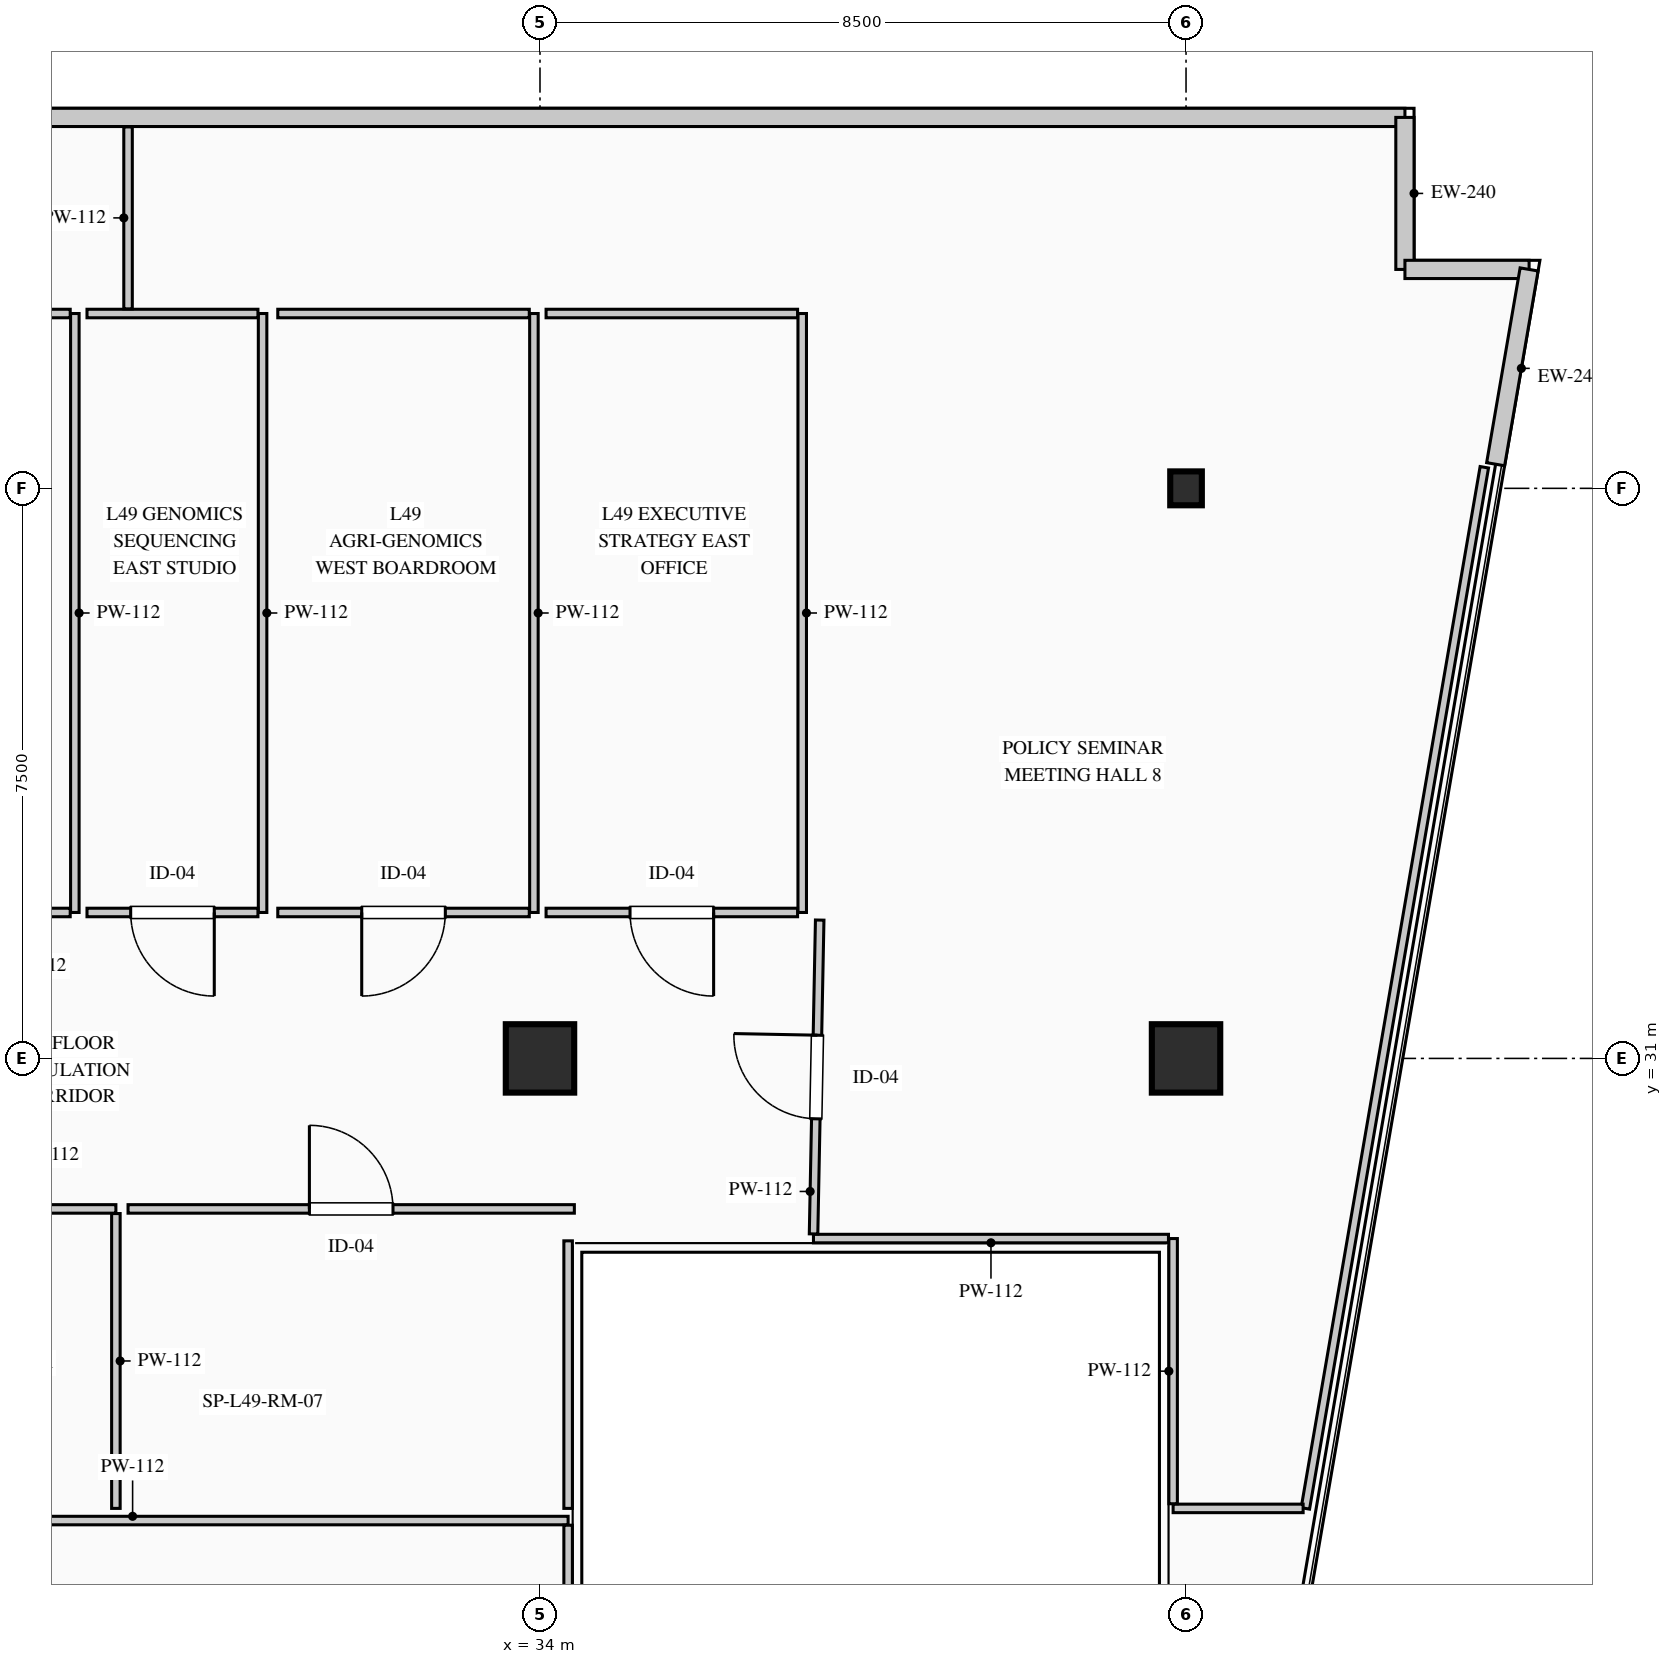
"""IFC4 building model, lengths in metres.
Left out: names, types, materials, properties, quantities, classifications, styles, units other than length and angle.
Written with IfcOpenShell. Run it as: python <this file> out.ifc"""

import sys

from ifc_helpers import new_model, si_unit, direction, frame, frame_2d, origin, origin_2d, place, context, subcontext, project, spatial, rectangle, i_section, extrude, element, fill, save


model = new_model("IFC4")
c1 = context("Model", 3, precision=1e-05, world=origin(), true_north=direction((0.0, 1.0)))
c2 = subcontext(c1, "Body", "Model", "MODEL_VIEW")
j1 = project(units=[si_unit("LENGTHUNIT", "METRE"), si_unit("PLANEANGLEUNIT", "RADIAN")], contexts=[c1])
p1 = place(None, origin())
s1 = spatial("IfcSite", under=j1, at=p1, CompositionType="ELEMENT")
p2 = place(p1, origin())
s2 = spatial("IfcBuilding", under=s1, at=p2, CompositionType="ELEMENT")
p3 = place(p2, frame((0.0, 0.0, 207.45)))
s3 = spatial("IfcBuildingStorey", under=s2, at=p3, CompositionType="ELEMENT", Elevation=207.45)
for number, where, z_axis, x_axis in (
    (1, (34.0, 31.0, 0.0), (0.0, 0.0, 1.0), (1.0, 0.0, 0.0)),
    (2, (42.5, 31.0, 0.0), (0.0, 0.0, 1.0), (1.0, 0.0, 0.0)),
):
    element("IfcColumn", number, at=place(p3, frame(where, z_axis=z_axis, x_axis=x_axis)), inside=s3, PredefinedType="COLUMN", context=c2, shape_type="SweptSolid", body=[
        extrude(rectangle(XDim=0.9, YDim=0.9, at=origin_2d()), origin(), (0.0, 0.0, 1.0), 3.95),
    ])
p4 = place(p3, frame((42.5, 38.5, 0.0), z_axis=(0.0, 0.0, 1.0), x_axis=(1.0, 0.0, 0.0)))
e3 = element("IfcColumn", 3, at=p4, inside=s3, PredefinedType="COLUMN", context=c2, shape_type="SweptSolid", body=[
    extrude(i_section(OverallWidth=0.416, OverallDepth=0.446, WebThickness=0.039, FlangeThickness=0.063, FilletRadius=0.015, at=origin_2d()), origin(), (0.0, 0.0, 1.0), 3.95),
])
p5 = place(p3, frame((4.62, 43.38, 0.0), z_axis=(0.0, 0.0, 1.0), x_axis=(1.0, 0.0, 0.0)))
e4 = element("IfcWall", 4, at=p5, inside=s3, PredefinedType="STANDARD", context=c2, shape_type="SweptSolid", body=[
    extrude(rectangle(XDim=40.76, YDim=0.24, at=frame_2d((20.38, 0.0))), origin(), (0.0, 0.0, 1.0), 3.7),
])
p6 = place(p5, frame((13.324, 0.0, 0.9)))
e5 = element("IfcOpeningElement", 5, at=p6, cuts=e4, PredefinedType="OPENING", context=c2, shape_type="SweptSolid", body=[
    extrude(rectangle(XDim=2.7, YDim=2.1, at=frame_2d((1.35, 1.05))), frame((0.0, 0.13, 0.0), z_axis=(0.0, -1.0, 0.0), x_axis=(1.0, 0.0, 0.0)), (0.0, 0.0, 1.0), 0.26),
])
p7 = place(p3, frame((45.38, 43.38, 0.0), z_axis=(0.0, 0.0, 1.0), x_axis=(0.0, -1.0, 0.0)))
e6 = element("IfcWall", 6, at=p7, inside=s3, PredefinedType="STANDARD", context=c2, shape_type="SweptSolid", body=[
    extrude(rectangle(XDim=2.0, YDim=0.24, at=frame_2d((1.0, 0.0))), origin(), (0.0, 0.0, 1.0), 3.7),
])
p8 = place(p3, frame((45.38, 41.38, 0.0), z_axis=(0.0, 0.0, 1.0), x_axis=(1.0, 0.0, 0.0)))
e7 = element("IfcWall", 7, at=p8, inside=s3, PredefinedType="STANDARD", context=c2, shape_type="SweptSolid", body=[
    extrude(rectangle(XDim=1.634, YDim=0.24, at=frame_2d((0.817, 0.0))), origin(), (0.0, 0.0, 1.0), 3.7),
])
p9 = place(p3, frame((47.014, 41.38, 0.0), z_axis=(0.0, 0.0, 1.0), x_axis=(-0.169406892601, -0.985546196147, 0.0)))
e8 = element("IfcWall", 8, at=p9, inside=s3, PredefinedType="STANDARD", context=c2, shape_type="SweptSolid", body=[
    extrude(rectangle(XDim=2.6, YDim=0.24, at=frame_2d((1.3, 0.0))), origin(), (0.0, 0.0, 1.0), 3.7),
])
p10 = place(p3, frame((27.88, 40.8, 0.0), z_axis=(0.0, 0.0, 1.0), x_axis=(0.0, -1.0, 0.0)))
e9 = element("IfcWall", 9, at=p10, inside=s3, PredefinedType="PARTITIONING", context=c2, shape_type="SweptSolid", body=[
    extrude(rectangle(XDim=7.88, YDim=0.112, at=frame_2d((3.94, 0.0))), origin(), (0.0, 0.0, 1.0), 3.7),
])
p11 = place(p3, frame((27.819, 32.92, 0.0), z_axis=(0.0, 0.0, 1.0), x_axis=(-1.0, 0.0, 0.0)))
e10 = element("IfcWall", 10, at=p11, inside=s3, PredefinedType="PARTITIONING", context=c2, shape_type="SweptSolid", body=[
    extrude(rectangle(XDim=3.769, YDim=0.112, at=frame_2d((1.885, 0.0))), origin(), (0.0, 0.0, 1.0), 3.7),
])
p12 = place(p11, frame((1.334, 0.0, 0.0)))
e11 = element("IfcOpeningElement", 11, at=p12, cuts=e10, PredefinedType="OPENING", context=c2, shape_type="SweptSolid", body=[
    extrude(rectangle(XDim=1.1, YDim=2.2, at=frame_2d((0.55, 1.1))), frame((0.0, 0.066, 0.0), z_axis=(0.0, -1.0, 0.0), x_axis=(1.0, 0.0, 0.0)), (0.0, 0.0, 1.0), 0.132),
])
p13 = place(p3, frame((24.111, 40.8, 0.0), z_axis=(0.0, 0.0, 1.0), x_axis=(1.0, 0.0, 0.0)))
e12 = element("IfcWall", 12, at=p13, inside=s3, PredefinedType="PARTITIONING", context=c2, shape_type="SweptSolid", body=[
    extrude(rectangle(XDim=3.708, YDim=0.112, at=frame_2d((1.854, 0.0))), origin(), (0.0, 0.0, 1.0), 3.7),
])
p14 = place(p3, frame((30.35, 40.8, 0.0), z_axis=(0.0, 0.0, 1.0), x_axis=(0.0, -1.0, 0.0)))
e13 = element("IfcWall", 13, at=p14, inside=s3, PredefinedType="PARTITIONING", context=c2, shape_type="SweptSolid", body=[
    extrude(rectangle(XDim=7.88, YDim=0.112, at=frame_2d((3.94, 0.0))), origin(), (0.0, 0.0, 1.0), 3.7),
])
p15 = place(p3, frame((30.289, 32.92, 0.0), z_axis=(0.0, 0.0, 1.0), x_axis=(-1.0, 0.0, 0.0)))
e14 = element("IfcWall", 14, at=p15, inside=s3, PredefinedType="PARTITIONING", context=c2, shape_type="SweptSolid", body=[
    extrude(rectangle(XDim=2.249, YDim=0.112, at=frame_2d((1.125, 0.0))), origin(), (0.0, 0.0, 1.0), 3.7),
])
p16 = place(p15, frame((0.574, 0.0, 0.0)))
e15 = element("IfcOpeningElement", 15, at=p16, cuts=e14, PredefinedType="OPENING", context=c2, shape_type="SweptSolid", body=[
    extrude(rectangle(XDim=1.1, YDim=2.2, at=frame_2d((0.55, 1.1))), frame((0.0, 0.066, 0.0), z_axis=(0.0, -1.0, 0.0), x_axis=(1.0, 0.0, 0.0)), (0.0, 0.0, 1.0), 0.132),
])
p17 = place(p3, frame((28.04, 40.8, 0.0), z_axis=(0.0, 0.0, 1.0), x_axis=(1.0, 0.0, 0.0)))
e16 = element("IfcWall", 16, at=p17, inside=s3, PredefinedType="PARTITIONING", context=c2, shape_type="SweptSolid", body=[
    extrude(rectangle(XDim=2.249, YDim=0.112, at=frame_2d((1.125, 0.0))), origin(), (0.0, 0.0, 1.0), 3.7),
])
p18 = place(p3, frame((33.92, 40.8, 0.0), z_axis=(0.0, 0.0, 1.0), x_axis=(0.0, -1.0, 0.0)))
e17 = element("IfcWall", 17, at=p18, inside=s3, PredefinedType="PARTITIONING", context=c2, shape_type="SweptSolid", body=[
    extrude(rectangle(XDim=7.88, YDim=0.112, at=frame_2d((3.94, 0.0))), origin(), (0.0, 0.0, 1.0), 3.7),
])
p19 = place(p3, frame((33.859, 32.92, 0.0), z_axis=(0.0, 0.0, 1.0), x_axis=(-1.0, 0.0, 0.0)))
e18 = element("IfcWall", 18, at=p19, inside=s3, PredefinedType="PARTITIONING", context=c2, shape_type="SweptSolid", body=[
    extrude(rectangle(XDim=3.309, YDim=0.112, at=frame_2d((1.654, 0.0))), origin(), (0.0, 0.0, 1.0), 3.7),
])
p20 = place(p19, frame((1.104, 0.0, 0.0)))
e19 = element("IfcOpeningElement", 19, at=p20, cuts=e18, PredefinedType="OPENING", context=c2, shape_type="SweptSolid", body=[
    extrude(rectangle(XDim=1.1, YDim=2.2, at=frame_2d((0.55, 1.1))), frame((0.0, 0.066, 0.0), z_axis=(0.0, -1.0, 0.0), x_axis=(1.0, 0.0, 0.0)), (0.0, 0.0, 1.0), 0.132),
])
p21 = place(p3, frame((30.55, 40.8, 0.0), z_axis=(0.0, 0.0, 1.0), x_axis=(1.0, 0.0, 0.0)))
e20 = element("IfcWall", 20, at=p21, inside=s3, PredefinedType="PARTITIONING", context=c2, shape_type="SweptSolid", body=[
    extrude(rectangle(XDim=3.309, YDim=0.112, at=frame_2d((1.654, 0.0))), origin(), (0.0, 0.0, 1.0), 3.7),
])
p22 = place(p3, frame((37.45, 40.8, 0.0), z_axis=(0.0, 0.0, 1.0), x_axis=(0.0, -1.0, 0.0)))
e21 = element("IfcWall", 21, at=p22, inside=s3, PredefinedType="PARTITIONING", context=c2, shape_type="SweptSolid", body=[
    extrude(rectangle(XDim=7.88, YDim=0.112, at=frame_2d((3.94, 0.0))), origin(), (0.0, 0.0, 1.0), 3.7),
])
p23 = place(p3, frame((37.389, 32.92, 0.0), z_axis=(0.0, 0.0, 1.0), x_axis=(-1.0, 0.0, 0.0)))
e22 = element("IfcWall", 22, at=p23, inside=s3, PredefinedType="PARTITIONING", context=c2, shape_type="SweptSolid", body=[
    extrude(rectangle(XDim=3.309, YDim=0.112, at=frame_2d((1.654, 0.0))), origin(), (0.0, 0.0, 1.0), 3.7),
])
p24 = place(p23, frame((1.104, 0.0, 0.0)))
e23 = element("IfcOpeningElement", 23, at=p24, cuts=e22, PredefinedType="OPENING", context=c2, shape_type="SweptSolid", body=[
    extrude(rectangle(XDim=1.1, YDim=2.2, at=frame_2d((0.55, 1.1))), frame((0.0, 0.066, 0.0), z_axis=(0.0, -1.0, 0.0), x_axis=(1.0, 0.0, 0.0)), (0.0, 0.0, 1.0), 0.132),
])
p25 = place(p3, frame((34.08, 40.8, 0.0), z_axis=(0.0, 0.0, 1.0), x_axis=(1.0, 0.0, 0.0)))
e24 = element("IfcWall", 24, at=p25, inside=s3, PredefinedType="PARTITIONING", context=c2, shape_type="SweptSolid", body=[
    extrude(rectangle(XDim=3.309, YDim=0.112, at=frame_2d((1.654, 0.0))), origin(), (0.0, 0.0, 1.0), 3.7),
])
p26 = place(p3, frame((22.91, 24.92, 0.0), z_axis=(0.0, 0.0, 1.0), x_axis=(1.0, 0.0, 0.0)))
e25 = element("IfcWall", 25, at=p26, inside=s3, PredefinedType="PARTITIONING", context=c2, shape_type="SweptSolid", body=[
    extrude(rectangle(XDim=11.46, YDim=0.112, at=frame_2d((5.73, 0.0))), origin(), (0.0, 0.0, 1.0), 3.325),
])
p27 = place(p3, frame((34.37, 24.859, 0.0), z_axis=(0.0, 0.0, 1.0), x_axis=(0.0, -1.0, 0.0)))
e26 = element("IfcWall", 26, at=p27, inside=s3, PredefinedType="PARTITIONING", context=c2, shape_type="SweptSolid", body=[
    extrude(rectangle(XDim=5.239, YDim=0.112, at=frame_2d((2.619, 0.0))), origin(), (0.0, 0.0, 1.0), 3.7),
])
p28 = place(p3, frame((22.91, 29.02, 0.0), z_axis=(0.0, 0.0, 1.0), x_axis=(1.0, 0.0, 0.0)))
e27 = element("IfcWall", 27, at=p28, inside=s3, PredefinedType="PARTITIONING", context=c2, shape_type="SweptSolid", body=[
    extrude(rectangle(XDim=5.51, YDim=0.112, at=frame_2d((2.755, 0.0))), origin(), (0.0, 0.0, 1.0), 3.485),
])
p29 = place(p28, frame((2.205, 0.0, 0.0)))
e28 = element("IfcOpeningElement", 28, at=p29, cuts=e27, PredefinedType="OPENING", context=c2, shape_type="SweptSolid", body=[
    extrude(rectangle(XDim=1.1, YDim=2.2, at=frame_2d((0.55, 1.1))), frame((0.0, 0.066, 0.0), z_axis=(0.0, -1.0, 0.0), x_axis=(1.0, 0.0, 0.0)), (0.0, 0.0, 1.0), 0.132),
])
p30 = place(p3, frame((28.42, 28.959, 0.0), z_axis=(0.0, 0.0, 1.0), x_axis=(0.0, -1.0, 0.0)))
e29 = element("IfcWall", 29, at=p30, inside=s3, PredefinedType="PARTITIONING", context=c2, shape_type="SweptSolid", body=[
    extrude(rectangle(XDim=3.879, YDim=0.112, at=frame_2d((1.939, 0.0))), origin(), (0.0, 0.0, 1.0), 3.7),
])
p31 = place(p3, frame((34.37, 28.6, 0.0), z_axis=(0.0, 0.0, 1.0), x_axis=(0.0, -1.0, 0.0)))
e30 = element("IfcWall", 30, at=p31, inside=s3, PredefinedType="PARTITIONING", context=c2, shape_type="SweptSolid", body=[
    extrude(rectangle(XDim=3.52, YDim=0.112, at=frame_2d((1.76, 0.0))), origin(), (0.0, 0.0, 1.0), 3.7),
])
p32 = place(p3, frame((28.58, 29.02, 0.0), z_axis=(0.0, 0.0, 1.0), x_axis=(1.0, 0.0, 0.0)))
e31 = element("IfcWall", 31, at=p32, inside=s3, PredefinedType="PARTITIONING", context=c2, shape_type="SweptSolid", body=[
    extrude(rectangle(XDim=5.872, YDim=0.112, at=frame_2d((2.936, 0.0))), origin(), (0.0, 0.0, 1.0), 3.485),
])
p33 = place(p32, frame((2.386, 0.0, 0.0)))
e32 = element("IfcOpeningElement", 32, at=p33, cuts=e31, PredefinedType="OPENING", context=c2, shape_type="SweptSolid", body=[
    extrude(rectangle(XDim=1.1, YDim=2.2, at=frame_2d((0.55, 1.1))), frame((0.0, 0.066, 0.0), z_axis=(0.0, -1.0, 0.0), x_axis=(1.0, 0.0, 0.0)), (0.0, 0.0, 1.0), 0.132),
])
p34 = place(p3, frame((46.425, 38.777, 0.0), z_axis=(0.0, 0.0, 1.0), x_axis=(-0.169413343695, -0.985545087238, 0.0)))
e33 = element("IfcWall", 33, at=p34, inside=s3, PredefinedType="PARTITIONING", context=c2, shape_type="SweptSolid", body=[
    extrude(rectangle(XDim=13.898, YDim=0.112, at=frame_2d((6.949, 0.0))), origin(), (0.0, 0.0, 1.0), 3.7),
])
p35 = place(p3, frame((44.041, 25.08, 0.0), z_axis=(0.0, 0.0, 1.0), x_axis=(-1.0, 0.0, 0.0)))
e34 = element("IfcWall", 34, at=p35, inside=s3, PredefinedType="PARTITIONING", context=c2, shape_type="SweptSolid", body=[
    extrude(rectangle(XDim=1.71, YDim=0.112, at=frame_2d((0.855, 0.0))), origin(), (0.0, 0.0, 1.0), 3.7),
])
p36 = place(p3, frame((42.33, 25.141, 0.0), z_axis=(0.0, 0.0, 1.0), x_axis=(0.0, 1.0, 0.0)))
e35 = element("IfcWall", 35, at=p36, inside=s3, PredefinedType="PARTITIONING", context=c2, shape_type="SweptSolid", body=[
    extrude(rectangle(XDim=3.489, YDim=0.112, at=frame_2d((1.744, 0.0))), origin(), (0.0, 0.0, 1.0), 3.7),
])
p37 = place(p3, frame((42.269, 28.63, 0.0), z_axis=(0.0, 0.0, 1.0), x_axis=(-1.0, 0.0, 0.0)))
e36 = element("IfcWall", 36, at=p37, inside=s3, PredefinedType="PARTITIONING", context=c2, shape_type="SweptSolid", body=[
    extrude(rectangle(XDim=4.671, YDim=0.112, at=frame_2d((2.335, 0.0))), origin(), (0.0, 0.0, 1.0), 3.7),
])
p38 = place(p3, frame((37.599, 28.691, 0.0), z_axis=(0.0, 0.0, 1.0), x_axis=(0.019566997539, 0.999808547977, 0.0)))
e37 = element("IfcWall", 37, at=p38, inside=s3, PredefinedType="PARTITIONING", context=c2, shape_type="SweptSolid", body=[
    extrude(rectangle(XDim=4.13, YDim=0.112, at=frame_2d((2.065, 0.0))), origin(), (0.0, 0.0, 1.0), 3.7),
])
p39 = place(p38, frame((1.515, 0.0, 0.0)))
e38 = element("IfcOpeningElement", 38, at=p39, cuts=e37, PredefinedType="OPENING", context=c2, shape_type="SweptSolid", body=[
    extrude(rectangle(XDim=1.1, YDim=2.2, at=frame_2d((0.55, 1.1))), frame((0.0, 0.066, 0.0), z_axis=(0.0, -1.0, 0.0), x_axis=(1.0, 0.0, 0.0)), (0.0, 0.0, 1.0), 0.132),
])
p40 = place(p3, frame((28.58, 40.861, 0.0), z_axis=(0.0, 0.0, 1.0), x_axis=(0.0, 1.0, 0.0)))
e39 = element("IfcWall", 39, at=p40, inside=s3, PredefinedType="PARTITIONING", context=c2, shape_type="SweptSolid", body=[
    extrude(rectangle(XDim=2.394, YDim=0.112, at=frame_2d((1.197, 0.0))), origin(), (0.0, 0.0, 1.0), 3.7),
])
p41 = place(p16, origin())
e40 = element("IfcDoor", 40, at=p41, inside=s3, OperationType="SINGLE_SWING_LEFT", PredefinedType="DOOR", context=c2, shape_type="SweptSolid", body=[
    extrude(rectangle(XDim=1.1, YDim=2.2, at=frame_2d((0.55, 1.1))), frame((0.0, 0.025, 0.0), z_axis=(0.0, -1.0, 0.0), x_axis=(1.0, 0.0, 0.0)), (0.0, 0.0, 1.0), 0.05),
])
fill(e15, e40)
p42 = place(p20, origin())
e41 = element("IfcDoor", 41, at=p42, inside=s3, OperationType="SINGLE_SWING_RIGHT", PredefinedType="DOOR", context=c2, shape_type="SweptSolid", body=[
    extrude(rectangle(XDim=1.1, YDim=2.2, at=frame_2d((0.55, 1.1))), frame((0.0, 0.025, 0.0), z_axis=(0.0, -1.0, 0.0), x_axis=(1.0, 0.0, 0.0)), (0.0, 0.0, 1.0), 0.05),
])
fill(e19, e41)
p43 = place(p24, origin())
e42 = element("IfcDoor", 42, at=p43, inside=s3, OperationType="SINGLE_SWING_LEFT", PredefinedType="DOOR", context=c2, shape_type="SweptSolid", body=[
    extrude(rectangle(XDim=1.1, YDim=2.2, at=frame_2d((0.55, 1.1))), frame((0.0, 0.025, 0.0), z_axis=(0.0, -1.0, 0.0), x_axis=(1.0, 0.0, 0.0)), (0.0, 0.0, 1.0), 0.05),
])
fill(e23, e42)
p44 = place(p33, origin())
e43 = element("IfcDoor", 43, at=p44, inside=s3, OperationType="SINGLE_SWING_LEFT", PredefinedType="DOOR", context=c2, shape_type="SweptSolid", body=[
    extrude(rectangle(XDim=1.1, YDim=2.2, at=frame_2d((0.55, 1.1))), frame((0.0, 0.025, 0.0), z_axis=(0.0, -1.0, 0.0), x_axis=(1.0, 0.0, 0.0)), (0.0, 0.0, 1.0), 0.05),
])
fill(e32, e43)
p45 = place(p39, origin())
e44 = element("IfcDoor", 44, at=p45, inside=s3, OperationType="SINGLE_SWING_RIGHT", PredefinedType="DOOR", context=c2, shape_type="SweptSolid", body=[
    extrude(rectangle(XDim=1.1, YDim=2.2, at=frame_2d((0.55, 1.1))), frame((0.0, 0.025, 0.0), z_axis=(0.0, -1.0, 0.0), x_axis=(1.0, 0.0, 0.0)), (0.0, 0.0, 1.0), 0.05),
])
fill(e38, e44)
save(model, sys.argv[1])
